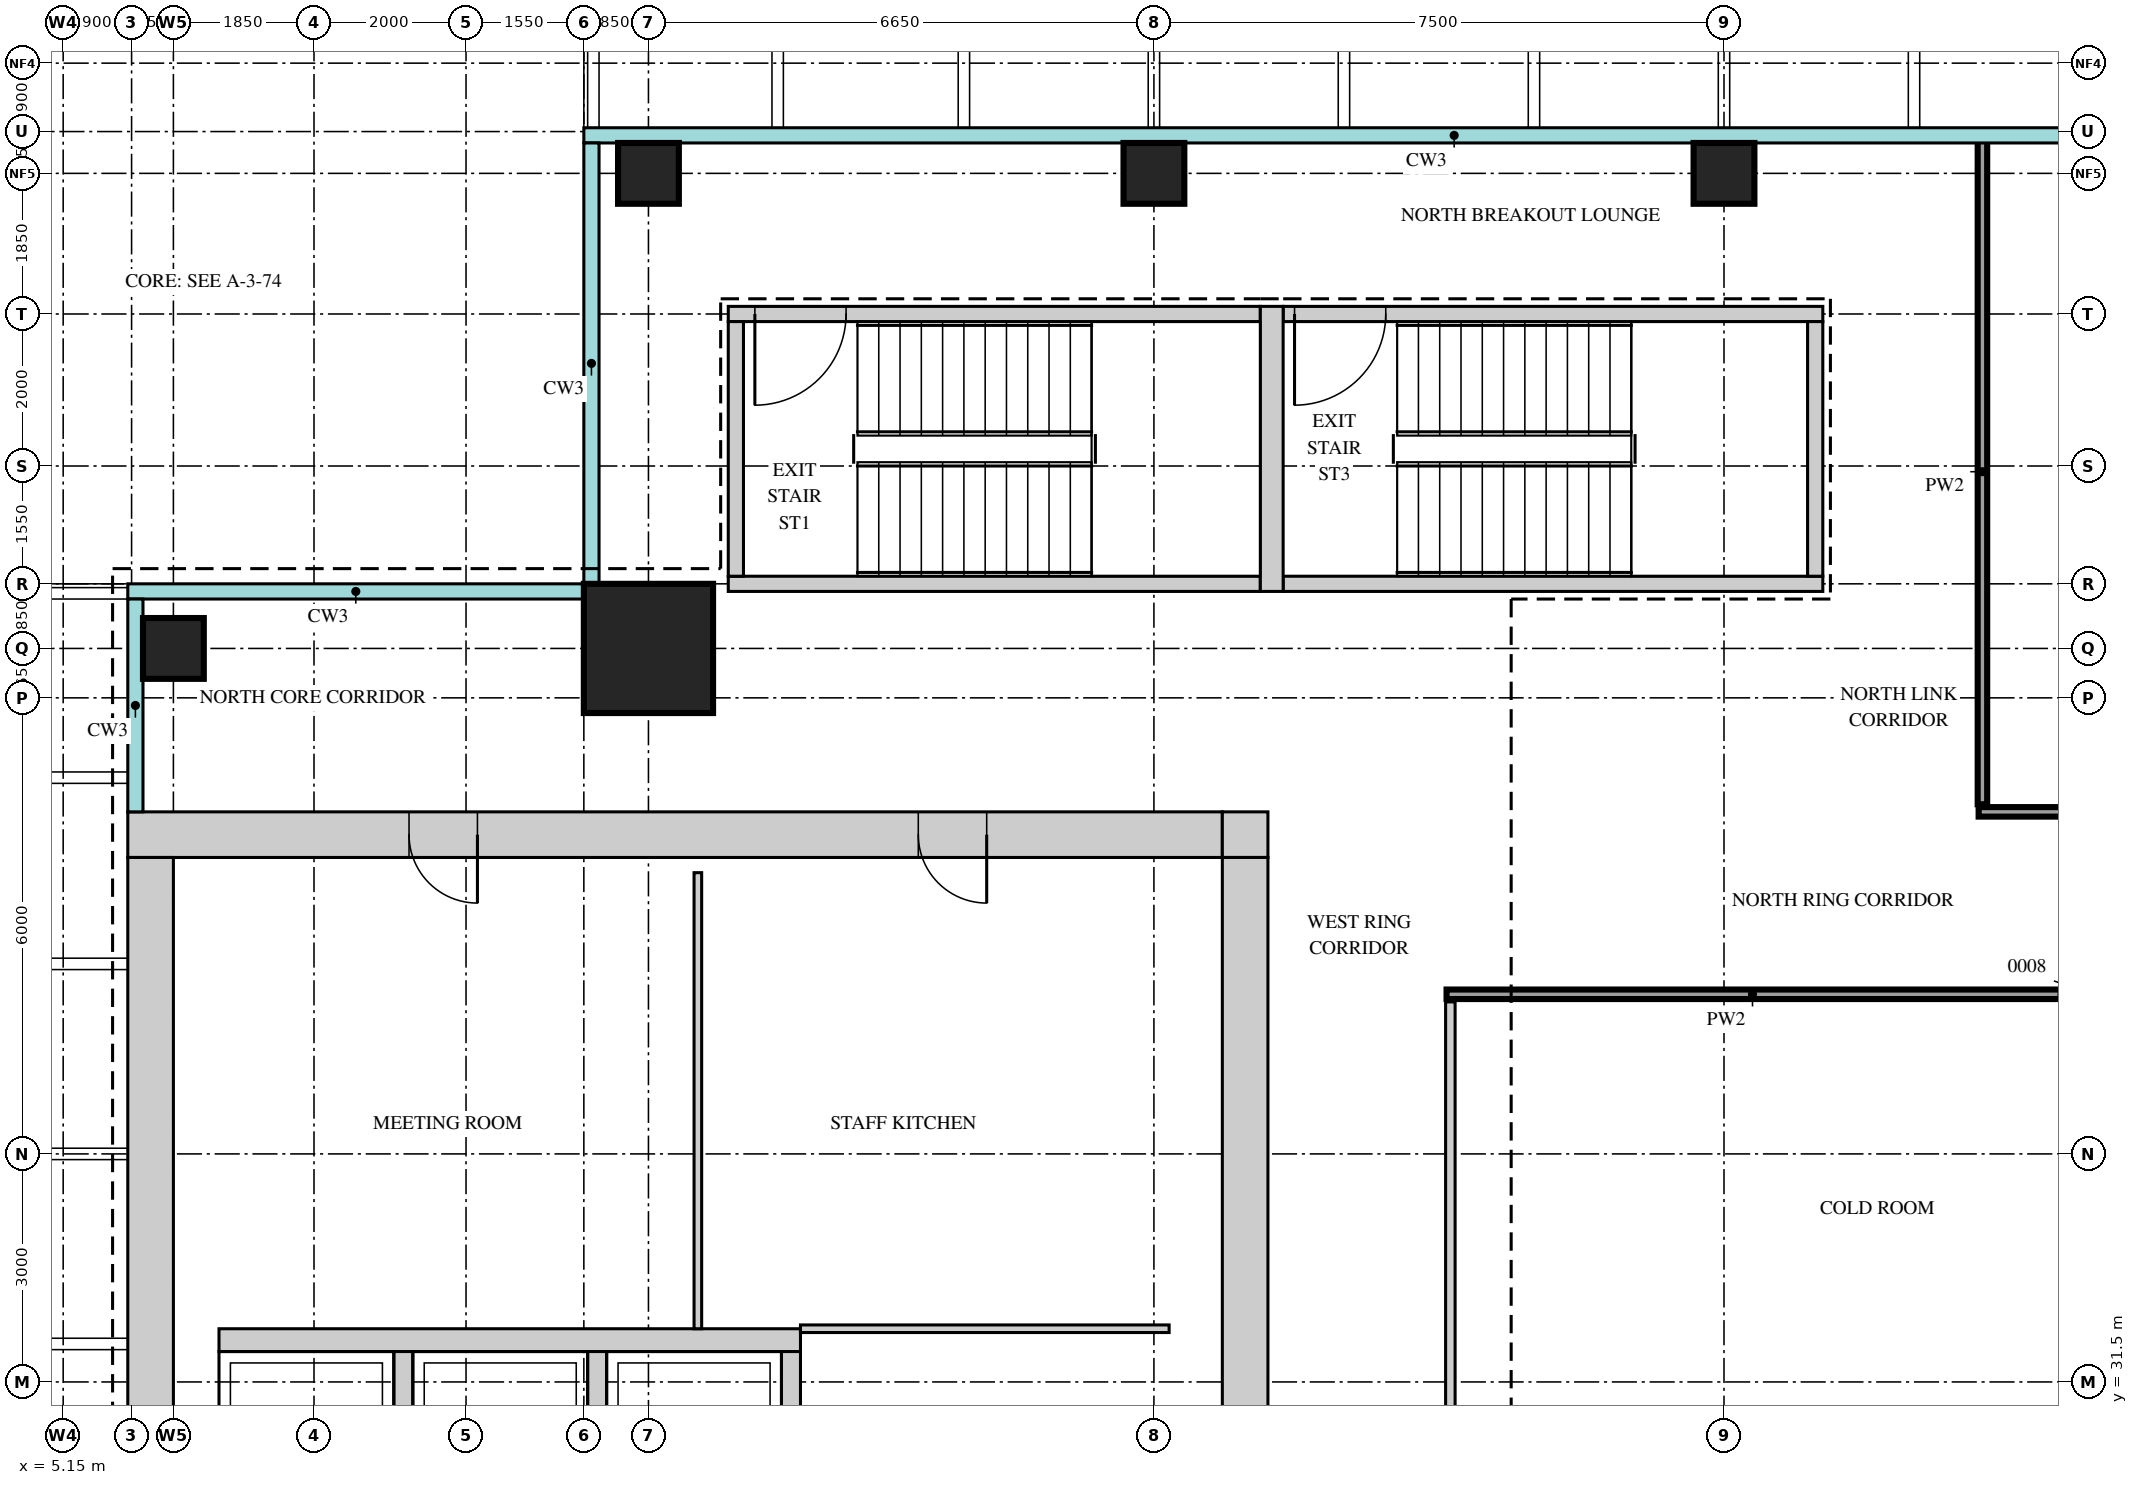
"""IFC4 building model, lengths in metres.
Left out: names, types, materials, properties, quantities, classifications, styles, units other than length and angle.
Written with IfcOpenShell. Run it as: python <this file> out.ifc"""

import sys

from ifc_helpers import new_model, si_unit, direction, frame, frame_2d, origin, origin_2d, place, context, subcontext, project, spatial, rectangle, extrude, source, transform, mapped, element, fill, save


model = new_model("IFC4")
c1 = context("Model", 3, precision=1e-05, world=origin(), true_north=direction((0.0, 1.0)))
c2 = subcontext(c1, "Body", "Model", "MODEL_VIEW")
j1 = project(units=[si_unit("LENGTHUNIT", "METRE"), si_unit("PLANEANGLEUNIT", "RADIAN")], contexts=[c1])
p1 = place(None, origin())
s1 = spatial("IfcSite", under=j1, at=p1, CompositionType="ELEMENT")
p2 = place(p1, origin())
s2 = spatial("IfcBuilding", under=s1, at=p2, CompositionType="ELEMENT")
p3 = place(p2, frame((0.0, 0.0, 306.2)))
s3 = spatial("IfcBuildingStorey", under=s2, at=p3, CompositionType="ELEMENT", Elevation=306.2)
m1 = source(origin(), c2, "Body", "SweptSolid", [
    extrude(rectangle(XDim=14.4, YDim=0.6, at=frame_2d((7.2, 0.0))), origin(), (0.0, 0.0, 1.0), 3.75),
])
p4 = place(p3, frame((6.0, 38.7, 0.0), z_axis=(0.0, 0.0, 1.0), x_axis=(1.0, 0.0, 0.0)))
e1 = element("IfcWall", 1, at=p4, inside=s3, PredefinedType="SHEAR", context=c2, shape_type="MappedRepresentation", body=[
    mapped(m1, transform((0.0, 0.0, 0.0))),
])
m2 = source(origin(), c2, "Body", "SweptSolid", [
    extrude(rectangle(XDim=0.9, YDim=2.1, at=frame_2d((0.45, 1.05))), frame((0.0, 0.31, 0.0), z_axis=(0.0, -1.0, 0.0), x_axis=(1.0, 0.0, 0.0)), (0.0, 0.0, 1.0), 0.62),
])
p5 = place(p4, frame((3.7, 0.0, 0.0)))
e2 = element("IfcOpeningElement", 2, at=p5, cuts=e1, PredefinedType="OPENING", context=c2, shape_type="MappedRepresentation", body=[
    mapped(m2, transform((0.0, 0.0, 0.0))),
])
p6 = place(p4, frame((10.4, 0.0, 0.0)))
e3 = element("IfcOpeningElement", 3, at=p6, cuts=e1, PredefinedType="OPENING", context=c2, shape_type="MappedRepresentation", body=[
    mapped(m2, transform((0.0, 0.0, 0.0))),
])
m3 = source(origin(), c2, "Body", "SweptSolid", [
    extrude(rectangle(XDim=0.6, YDim=0.6, at=frame_2d((0.3, 0.0))), origin(), (0.0, 0.0, 1.0), 3.75),
])
p7 = place(p3, frame((20.4, 38.7, 0.0), z_axis=(0.0, 0.0, 1.0), x_axis=(1.0, 0.0, 0.0)))
e4 = element("IfcWall", 4, at=p7, inside=s3, PredefinedType="SHEAR", context=c2, shape_type="MappedRepresentation", body=[
    mapped(m3, transform((0.0, 0.0, 0.0))),
])
m4 = source(origin(), c2, "Body", "SweptSolid", [
    extrude(rectangle(XDim=22.8, YDim=0.6, at=frame_2d((11.4, 0.0))), origin(), (0.0, 0.0, 1.0), 3.75),
])
p8 = place(p3, frame((20.7, 15.6, 0.0), z_axis=(0.0, 0.0, 1.0), x_axis=(0.0, 1.0, 0.0)))
e5 = element("IfcWall", 5, at=p8, inside=s3, PredefinedType="SHEAR", context=c2, shape_type="MappedRepresentation", body=[
    mapped(m4, transform((0.0, 0.0, 0.0))),
])
m5 = source(origin(), c2, "Body", "SweptSolid", [
    extrude(rectangle(XDim=1.8, YDim=2.1, at=frame_2d((0.9, 1.05))), frame((0.0, 0.31, 0.0), z_axis=(0.0, -1.0, 0.0), x_axis=(1.0, 0.0, 0.0)), (0.0, 0.0, 1.0), 0.62),
])
p9 = place(p8, frame((10.9, 0.0, 0.0)))
e6 = element("IfcOpeningElement", 6, at=p9, cuts=e5, PredefinedType="OPENING", context=c2, shape_type="MappedRepresentation", body=[
    mapped(m5, transform((0.0, 0.0, 0.0))),
])
p10 = place(p8, frame((0.55, 0.0, 0.0)))
e7 = element("IfcOpeningElement", 7, at=p10, cuts=e5, PredefinedType="OPENING", context=c2, shape_type="MappedRepresentation", body=[
    mapped(m2, transform((0.0, 0.0, 0.0))),
])
p11 = place(p8, frame((3.0, 0.0, 0.0)))
e8 = element("IfcOpeningElement", 8, at=p11, cuts=e5, PredefinedType="OPENING", context=c2, shape_type="MappedRepresentation", body=[
    mapped(m2, transform((0.0, 0.0, 0.0))),
])
p12 = place(p8, frame((5.75, 0.0, 0.0)))
e9 = element("IfcOpeningElement", 9, at=p12, cuts=e5, PredefinedType="OPENING", context=c2, shape_type="MappedRepresentation", body=[
    mapped(m2, transform((0.0, 0.0, 0.0))),
])
p13 = place(p3, frame((6.3, 15.6, 0.0), z_axis=(0.0, 0.0, 1.0), x_axis=(0.0, 1.0, 0.0)))
e10 = element("IfcWall", 10, at=p13, inside=s3, PredefinedType="SHEAR", context=c2, shape_type="MappedRepresentation", body=[
    mapped(m4, transform((0.0, 0.0, 0.0))),
])
m6 = source(origin(), c2, "Body", "SweptSolid", [
    extrude(rectangle(XDim=7.0, YDim=0.2, at=frame_2d((3.5, 0.0))), origin(), (0.0, 0.0, 1.0), 3.75),
])
p14 = place(p3, frame((13.9, 45.55, 0.0), z_axis=(0.0, 0.0, 1.0), x_axis=(1.0, 0.0, 0.0)))
e11 = element("IfcWall", 11, at=p14, inside=s3, PredefinedType="SHEAR", context=c2, shape_type="MappedRepresentation", body=[
    mapped(m6, transform((0.0, 0.0, 0.0))),
])
m7 = source(origin(), c2, "Body", "SweptSolid", [
    extrude(rectangle(XDim=1.2, YDim=2.1, at=frame_2d((0.6, 1.05))), frame((0.0, 0.11, 0.0), z_axis=(0.0, -1.0, 0.0), x_axis=(1.0, 0.0, 0.0)), (0.0, 0.0, 1.0), 0.22),
])
p15 = place(p14, frame((0.35, 0.0, 0.0)))
e12 = element("IfcOpeningElement", 12, at=p15, cuts=e11, PredefinedType="OPENING", context=c2, shape_type="MappedRepresentation", body=[
    mapped(m7, transform((0.0, 0.0, 0.0))),
])
p16 = place(p3, frame((13.9, 42.0, 0.0), z_axis=(0.0, 0.0, 1.0), x_axis=(1.0, 0.0, 0.0)))
e13 = element("IfcWall", 13, at=p16, inside=s3, PredefinedType="SHEAR", context=c2, shape_type="MappedRepresentation", body=[
    mapped(m6, transform((0.0, 0.0, 0.0))),
])
m8 = source(origin(), c2, "Body", "SweptSolid", [
    extrude(rectangle(XDim=7.1, YDim=0.2, at=frame_2d((3.55, 0.0))), origin(), (0.0, 0.0, 1.0), 3.75),
])
p17 = place(p3, frame((21.2, 45.55, 0.0), z_axis=(0.0, 0.0, 1.0), x_axis=(1.0, 0.0, 0.0)))
e14 = element("IfcWall", 14, at=p17, inside=s3, PredefinedType="SHEAR", context=c2, shape_type="MappedRepresentation", body=[
    mapped(m8, transform((0.0, 0.0, 0.0))),
])
p18 = place(p17, frame((0.15, 0.0, 0.0)))
e15 = element("IfcOpeningElement", 15, at=p18, cuts=e14, PredefinedType="OPENING", context=c2, shape_type="MappedRepresentation", body=[
    mapped(m7, transform((0.0, 0.0, 0.0))),
])
p19 = place(p3, frame((21.2, 42.0, 0.0), z_axis=(0.0, 0.0, 1.0), x_axis=(1.0, 0.0, 0.0)))
e16 = element("IfcWall", 16, at=p19, inside=s3, PredefinedType="SHEAR", context=c2, shape_type="MappedRepresentation", body=[
    mapped(m8, transform((0.0, 0.0, 0.0))),
])
m9 = source(origin(), c2, "Body", "SweptSolid", [
    extrude(rectangle(XDim=3.75, YDim=0.3, at=frame_2d((1.875, 0.0))), origin(), (0.0, 0.0, 1.0), 3.75),
])
p20 = place(p3, frame((21.05, 41.9, 0.0), z_axis=(0.0, 0.0, 1.0), x_axis=(0.0, 1.0, 0.0)))
e17 = element("IfcWall", 17, at=p20, inside=s3, PredefinedType="SHEAR", context=c2, shape_type="MappedRepresentation", body=[
    mapped(m9, transform((0.0, 0.0, 0.0))),
])
m10 = source(origin(), c2, "Body", "SweptSolid", [
    extrude(rectangle(XDim=3.35, YDim=0.2, at=frame_2d((1.675, 0.0))), origin(), (0.0, 0.0, 1.0), 3.75),
])
for number, where, z_axis, x_axis in (
    (18, (14.0, 42.1, 0.0), (0.0, 0.0, 1.0), (0.0, 1.0, 0.0)),
    (19, (28.2, 42.1, 0.0), (0.0, 0.0, 1.0), (0.0, 1.0, 0.0)),
):
    element("IfcWall", number, at=place(p3, frame(where, z_axis=z_axis, x_axis=x_axis)), inside=s3, PredefinedType="SHEAR", context=c2, shape_type="MappedRepresentation", body=[
        mapped(m10, transform((0.0, 0.0, 0.0))),
    ])
m11 = source(origin(), c2, "Body", "SweptSolid", [
    extrude(rectangle(XDim=7.65, YDim=0.3, at=frame_2d((3.825, 0.0))), origin(), (0.0, 0.0, 1.0), 3.75),
])
p21 = place(p3, frame((7.2, 32.05, 0.0), z_axis=(0.0, 0.0, 1.0), x_axis=(1.0, 0.0, 0.0)))
e20 = element("IfcWall", 20, at=p21, inside=s3, PredefinedType="STANDARD", context=c2, shape_type="MappedRepresentation", body=[
    mapped(m11, transform((0.0, 0.0, 0.0))),
])
m12 = source(origin(), c2, "Body", "SweptSolid", [
    extrude(rectangle(XDim=2.4, YDim=0.25, at=frame_2d((1.2, 0.0))), origin(), (0.0, 0.0, 1.0), 3.75),
])
for number, where, z_axis, x_axis in (
    (21, (9.625, 29.5, 0.0), (0.0, 0.0, 1.0), (0.0, 1.0, 0.0)),
    (22, (12.175, 29.5, 0.0), (0.0, 0.0, 1.0), (0.0, 1.0, 0.0)),
    (23, (14.725, 29.5, 0.0), (0.0, 0.0, 1.0), (0.0, 1.0, 0.0)),
):
    element("IfcWall", number, at=place(p3, frame(where, z_axis=z_axis, x_axis=x_axis)), inside=s3, PredefinedType="STANDARD", context=c2, shape_type="MappedRepresentation", body=[
        mapped(m12, transform((0.0, 0.0, 0.0))),
    ])
m13 = source(origin(), c2, "Body", "SweptSolid", [
    extrude(rectangle(XDim=1.7, YDim=1.7, at=origin_2d()), origin(), (0.0, 0.0, 1.0), 3.75),
])
p22 = place(p3, frame((12.85, 41.15, 0.0), z_axis=(0.0, 0.0, 1.0), x_axis=(1.0, 0.0, 0.0)))
e24 = element("IfcColumn", 24, at=p22, inside=s3, PredefinedType="COLUMN", context=c2, shape_type="MappedRepresentation", body=[
    mapped(m13, transform((0.0, 0.0, 0.0))),
])
m14 = source(origin(), c2, "Body", "SweptSolid", [
    extrude(rectangle(XDim=0.8, YDim=0.8, at=origin_2d()), origin(), (0.0, 0.0, 1.0), 3.75),
])
for number, where, z_axis, x_axis in (
    (25, (12.85, 47.4, 0.0), (0.0, 0.0, 1.0), (1.0, 0.0, 0.0)),
    (26, (19.5, 47.4, 0.0), (0.0, 0.0, 1.0), (1.0, 0.0, 0.0)),
    (27, (27.0, 47.4, 0.0), (0.0, 0.0, 1.0), (1.0, 0.0, 0.0)),
    (28, (6.6, 41.15, 0.0), (0.0, 0.0, 1.0), (1.0, 0.0, 0.0)),
):
    element("IfcColumn", number, at=place(p3, frame(where, z_axis=z_axis, x_axis=x_axis)), inside=s3, PredefinedType="COLUMN", context=c2, shape_type="MappedRepresentation", body=[
        mapped(m14, transform((0.0, 0.0, 0.0))),
    ])
m15 = source(origin(), c2, "Body", "SweptSolid", [
    extrude(rectangle(XDim=19.0, YDim=0.125, at=frame_2d((9.5, 0.0))), origin(), (0.0, 0.0, 1.0), 3.8),
])
p23 = place(p3, frame((23.4, 17.5, 0.0), z_axis=(0.0, 0.0, 1.0), x_axis=(0.0, 1.0, 0.0)))
e29 = element("IfcWall", 29, at=p23, inside=s3, PredefinedType="PARTITIONING", context=c2, shape_type="MappedRepresentation", body=[
    mapped(m15, transform((0.0, 0.0, 0.0))),
])
m16 = source(origin(), c2, "Body", "SweptSolid", [
    extrude(rectangle(XDim=0.9, YDim=2.1, at=frame_2d((0.45, 1.05))), frame((0.0, 0.073, 0.0), z_axis=(0.0, -1.0, 0.0), x_axis=(1.0, 0.0, 0.0)), (0.0, 0.0, 1.0), 0.145),
])
p24 = place(p23, frame((10.4, 0.0, 0.0)))
e30 = element("IfcOpeningElement", 30, at=p24, cuts=e29, PredefinedType="OPENING", context=c2, shape_type="MappedRepresentation", body=[
    mapped(m16, transform((0.0, 0.0, 0.0))),
])
m17 = source(origin(), c2, "Body", "SweptSolid", [
    extrude(rectangle(XDim=6.0, YDim=0.1, at=frame_2d((3.0, 0.0))), origin(), (0.0, 0.0, 1.0), 3.8),
])
p25 = place(p3, frame((13.5, 32.2, 0.0), z_axis=(0.0, 0.0, 1.0), x_axis=(0.0, 1.0, 0.0)))
e31 = element("IfcWall", 31, at=p25, inside=s3, PredefinedType="PARTITIONING", context=c2, shape_type="MappedRepresentation", body=[
    mapped(m17, transform((0.0, 0.0, 0.0))),
])
m18 = source(origin(), c2, "Body", "SweptSolid", [
    extrude(rectangle(XDim=4.85, YDim=0.1, at=frame_2d((2.425, 0.0))), origin(), (0.0, 0.0, 1.0), 3.8),
])
p26 = place(p3, frame((14.85, 32.2, 0.0), z_axis=(0.0, 0.0, 1.0), x_axis=(1.0, 0.0, 0.0)))
e32 = element("IfcWall", 32, at=p26, inside=s3, PredefinedType="PARTITIONING", context=c2, shape_type="MappedRepresentation", body=[
    mapped(m18, transform((0.0, 0.0, 0.0))),
])
m19 = source(origin(), c2, "Body", "SweptSolid", [
    extrude(rectangle(XDim=16.7, YDim=0.125, at=frame_2d((8.35, 0.0))), origin(), (0.0, 0.0, 1.0), 3.8),
])
p27 = place(p3, frame((23.35, 36.6, 0.0), z_axis=(0.0, 0.0, 1.0), x_axis=(1.0, 0.0, 0.0)))
e33 = element("IfcWall", 33, at=p27, inside=s3, PredefinedType="PARTITIONING", context=c2, shape_type="MappedRepresentation", body=[
    mapped(m19, transform((0.0, 0.0, 0.0))),
])
p28 = place(p27, frame((8.05, 0.0, 0.0)))
e34 = element("IfcOpeningElement", 34, at=p28, cuts=e33, PredefinedType="OPENING", context=c2, shape_type="MappedRepresentation", body=[
    mapped(m16, transform((0.0, 0.0, 0.0))),
])
m20 = source(origin(), c2, "Body", "SweptSolid", [
    extrude(rectangle(XDim=12.1, YDim=0.125, at=frame_2d((6.05, 0.0))), origin(), (0.0, 0.0, 1.0), 3.8),
])
p29 = place(p3, frame((30.35, 39.0, 0.0), z_axis=(0.0, 0.0, 1.0), x_axis=(1.0, 0.0, 0.0)))
e35 = element("IfcWall", 35, at=p29, inside=s3, PredefinedType="PARTITIONING", context=c2, shape_type="MappedRepresentation", body=[
    mapped(m20, transform((0.0, 0.0, 0.0))),
])
m21 = source(origin(), c2, "Body", "SweptSolid", [
    extrude(rectangle(XDim=1.2, YDim=2.1, at=frame_2d((0.6, 1.05))), frame((0.0, 0.073, 0.0), z_axis=(0.0, -1.0, 0.0), x_axis=(1.0, 0.0, 0.0)), (0.0, 0.0, 1.0), 0.145),
])
p30 = place(p29, frame((5.25, 0.0, 0.0)))
e36 = element("IfcOpeningElement", 36, at=p30, cuts=e35, PredefinedType="OPENING", context=c2, shape_type="MappedRepresentation", body=[
    mapped(m21, transform((0.0, 0.0, 0.0))),
])
m22 = source(origin(), c2, "Body", "SweptSolid", [
    extrude(rectangle(XDim=8.75, YDim=0.125, at=frame_2d((4.375, 0.0))), origin(), (0.0, 0.0, 1.0), 3.8),
])
p31 = place(p3, frame((30.4, 39.1, 0.0), z_axis=(0.0, 0.0, 1.0), x_axis=(0.0, 1.0, 0.0)))
e37 = element("IfcWall", 37, at=p31, inside=s3, PredefinedType="PARTITIONING", context=c2, shape_type="MappedRepresentation", body=[
    mapped(m22, transform((0.0, 0.0, 0.0))),
])
m23 = source(origin(), c2, "Body", "SweptSolid", [
    extrude(rectangle(XDim=0.9, YDim=2.1, at=frame_2d((0.45, 1.05))), frame((0.0, 0.25, 0.0), z_axis=(0.0, -1.0, 0.0), x_axis=(1.0, 0.0, 0.0)), (0.0, 0.0, 1.0), 0.5),
])
p32 = place(p5, origin())
e38 = element("IfcDoor", 38, at=p32, inside=s3, OperationType="SINGLE_SWING_RIGHT", PredefinedType="DOOR", context=c2, shape_type="MappedRepresentation", body=[
    mapped(m23, transform((0.0, 0.0, 0.0))),
])
fill(e2, e38)
p33 = place(p6, origin())
e39 = element("IfcDoor", 39, at=p33, inside=s3, OperationType="SINGLE_SWING_RIGHT", PredefinedType="DOOR", context=c2, shape_type="MappedRepresentation", body=[
    mapped(m23, transform((0.0, 0.0, 0.0))),
])
fill(e3, e39)
m24 = source(origin(), c2, "Body", "SweptSolid", [
    extrude(rectangle(XDim=1.2, YDim=2.1, at=frame_2d((0.6, 1.05))), frame((0.0, 0.025, 0.0), z_axis=(0.0, -1.0, 0.0), x_axis=(1.0, 0.0, 0.0)), (0.0, 0.0, 1.0), 0.05),
])
p34 = place(p15, origin())
e40 = element("IfcDoor", 40, at=p34, inside=s3, OperationType="SINGLE_SWING_LEFT", PredefinedType="DOOR", context=c2, shape_type="MappedRepresentation", body=[
    mapped(m24, transform((0.0, 0.0, 0.0))),
])
fill(e12, e40)
p35 = place(p18, origin())
e41 = element("IfcDoor", 41, at=p35, inside=s3, OperationType="SINGLE_SWING_LEFT", PredefinedType="DOOR", context=c2, shape_type="MappedRepresentation", body=[
    mapped(m24, transform((0.0, 0.0, 0.0))),
])
fill(e15, e41)
save(model, sys.argv[1])
